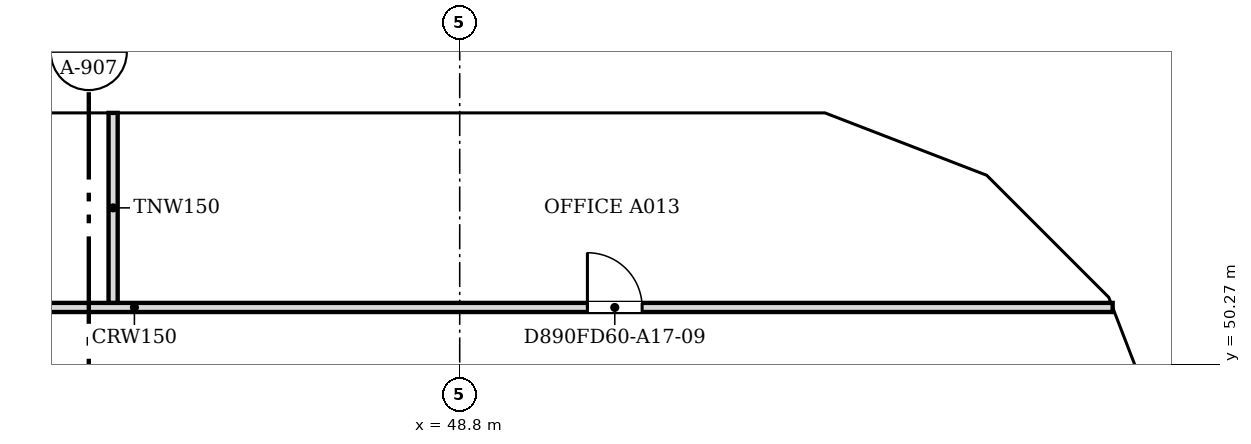
"""IFC4 building model, lengths in metres.
Left out: names, types, materials, properties, quantities, classifications, styles, units other than length and angle.
Written with IfcOpenShell. Run it as: python <this file> out.ifc"""

import sys

from ifc_helpers import new_model, si_unit, direction, frame, frame_2d, origin, place, context, subcontext, project, spatial, polyline, rectangle, outline, extrude, faceted_brep, source, transform, mapped, element, fill, save


model = new_model("IFC4")
c1 = context("Model", 3, precision=1e-05, world=origin(), true_north=direction((0.0, 1.0)))
c2 = subcontext(c1, "Body", "Model", "MODEL_VIEW")
j1 = project(units=[si_unit("LENGTHUNIT", "METRE"), si_unit("PLANEANGLEUNIT", "RADIAN")], contexts=[c1])
p1 = place(None, origin())
s1 = spatial("IfcSite", under=j1, at=p1, CompositionType="ELEMENT")
p2 = place(p1, origin())
s2 = spatial("IfcBuilding", under=s1, at=p2, CompositionType="ELEMENT")
p3 = place(p2, frame((0.0, 0.0, 185.8)))
s3 = spatial("IfcBuildingStorey", under=s2, at=p3, CompositionType="ELEMENT", Elevation=185.8)
m1 = source(origin(), c2, "Body", "Brep", [
    faceted_brep([(2.95, -0.25, 0.0), (3.003, -0.25, 0.068), (3.003, -0.25, 7.532), (2.95, -0.25, 7.6), (0.0, -0.25, 3.8), (0.047, 0.25, 3.86), (2.898, 0.25, 7.532), (2.898, 0.25, 0.068), (0.047, 0.25, 3.74), (2.95, 0.0, 0.0), (2.95, 0.0, 7.6), (0.0, 0.0, 3.8)], [[[0, 1, 2, 3, 4]], [[5, 6, 7, 8]], [[1, 0, 9]], [[10, 3, 2]], [[6, 5, 11, 4, 3, 10]], [[8, 7, 9, 0, 4, 11]], [[8, 11, 5]], [[1, 9, 7, 6, 10, 2]]]),
])
p4 = place(p3, frame((60.75, 48.753, -3.8), z_axis=(0.0, 0.0, 1.0), x_axis=(-0.35992665181, 0.932980602862, 0.0)))
e1 = element("IfcWall", 1, at=p4, inside=s3, PredefinedType="SOLIDWALL", context=c2, shape_type="MappedRepresentation", body=[
    mapped(m1, transform((0.0, 0.0, 0.0), scale=1.0)),
])
m2 = source(origin(), c2, "Body", "SweptSolid", [
    extrude(outline(polyline([(2.75, 6.935), (0.316, 3.8), (2.75, 0.665), (2.75, 6.935)])), frame((0.0, 0.26, 0.0), z_axis=(0.0, -1.0, 0.0), x_axis=(1.0, 0.0, 0.0)), (0.0, 0.0, 1.0), 0.52),
])
p5 = place(p4, origin())
e2 = element("IfcOpeningElement", 2, at=p5, cuts=e1, PredefinedType="OPENING", context=c2, shape_type="MappedRepresentation", body=[
    mapped(m2, transform((0.0, 0.0, 0.0), scale=1.0)),
])
m3 = source(origin(), c2, "Body", "Brep", [
    faceted_brep([(0.053, -0.25, 0.0), (2.997, -0.25, 3.8), (0.053, -0.25, 7.6), (0.0, -0.25, 7.532), (0.0, -0.25, 0.068), (0.106, 0.25, 7.532), (2.944, 0.25, 3.868), (2.944, 0.25, 3.732), (0.106, 0.25, 0.068), (2.997, 0.0, 3.8), (0.053, 0.0, 0.0), (0.053, 0.0, 7.6)], [[[0, 1, 2, 3, 4]], [[5, 6, 7, 8]], [[8, 7, 9, 1, 0, 10]], [[6, 5, 11, 2, 1, 9]], [[3, 2, 11]], [[10, 0, 4]], [[8, 10, 4, 3, 11, 5]], [[9, 7, 6]]]),
])
p6 = place(p3, frame((59.726, 51.469, -3.8), z_axis=(0.0, 0.0, 1.0), x_axis=(-0.707106781187, 0.707106781187, 0.0)))
e3 = element("IfcWall", 3, at=p6, inside=s3, PredefinedType="SOLIDWALL", context=c2, shape_type="MappedRepresentation", body=[
    mapped(m3, transform((0.0, 0.0, 0.0), scale=1.0)),
])
m4 = source(origin(), c2, "Body", "SweptSolid", [
    extrude(outline(polyline([(0.253, 0.666), (2.681, 3.8), (0.253, 6.934), (0.253, 0.666)])), frame((0.0, 0.26, 0.0), z_axis=(0.0, -1.0, 0.0), x_axis=(1.0, 0.0, 0.0)), (0.0, 0.0, 1.0), 0.52),
])
p7 = place(p6, origin())
e4 = element("IfcOpeningElement", 4, at=p7, cuts=e3, PredefinedType="OPENING", context=c2, shape_type="MappedRepresentation", body=[
    mapped(m4, transform((0.0, 0.0, 0.0), scale=1.0)),
])
m5 = source(origin(), c2, "Body", "Brep", [
    faceted_brep([(2.95, -0.25, 0.0), (2.997, -0.25, 0.059), (2.997, -0.25, 7.541), (2.95, -0.25, 7.6), (0.0, -0.25, 3.8), (0.053, 0.25, 3.868), (2.904, 0.25, 7.54), (2.904, 0.25, 0.06), (0.053, 0.25, 3.732), (2.95, 0.0, 0.0), (2.95, 0.0, 7.6), (0.0, 0.0, 3.8)], [[[0, 1, 2, 3, 4]], [[5, 6, 7, 8]], [[1, 0, 9]], [[10, 3, 2]], [[6, 5, 11, 4, 3, 10]], [[8, 7, 9, 0, 4, 11]], [[8, 11, 5]], [[1, 9, 7, 6, 10, 2]]]),
])
p8 = place(p3, frame((57.606, 53.588, -3.8), z_axis=(0.0, 0.0, 1.0), x_axis=(-0.932990326376, 0.359901446078, 0.0)))
e5 = element("IfcWall", 5, at=p8, inside=s3, PredefinedType="SOLIDWALL", context=c2, shape_type="MappedRepresentation", body=[
    mapped(m5, transform((0.0, 0.0, 0.0), scale=1.0)),
])
p9 = place(p8, origin())
e6 = element("IfcOpeningElement", 6, at=p9, cuts=e5, PredefinedType="OPENING", context=c2, shape_type="MappedRepresentation", body=[
    mapped(m2, transform((0.0, 0.0, 0.0), scale=1.0)),
])
m6 = source(origin(), c2, "Body", "Brep", [
    faceted_brep([(0.047, -0.25, 0.0), (3.05, -0.25, 3.8), (0.047, -0.25, 7.6), (0.0, -0.25, 7.54), (0.0, -0.25, 0.06), (0.093, 0.25, 7.541), (3.05, 0.25, 3.8), (0.093, 0.25, 0.059), (0.047, 0.0, 0.0), (0.047, 0.0, 7.6)], [[[0, 1, 2, 3, 4]], [[5, 6, 7]], [[7, 6, 1, 0, 8]], [[6, 5, 9, 2, 1]], [[3, 2, 9]], [[8, 0, 4]], [[7, 8, 4, 3, 9, 5]]]),
])
p10 = place(p3, frame((54.9, 54.65, -3.8), z_axis=(0.0, 0.0, 1.0), x_axis=(-1.0, 0.0, 0.0)))
e7 = element("IfcWall", 7, at=p10, inside=s3, PredefinedType="SOLIDWALL", context=c2, shape_type="MappedRepresentation", body=[
    mapped(m6, transform((0.0, 0.0, 0.0), scale=1.0)),
])
m7 = source(origin(), c2, "Body", "SweptSolid", [
    extrude(outline(polyline([(0.247, 0.656), (2.731, 3.8), (0.247, 6.944), (0.247, 0.656)])), frame((0.0, 0.26, 0.0), z_axis=(0.0, -1.0, 0.0), x_axis=(1.0, 0.0, 0.0)), (0.0, 0.0, 1.0), 0.52),
])
p11 = place(p10, origin())
e8 = element("IfcOpeningElement", 8, at=p11, cuts=e7, PredefinedType="OPENING", context=c2, shape_type="MappedRepresentation", body=[
    mapped(m7, transform((0.0, 0.0, 0.0), scale=1.0)),
])
m8 = source(origin(), c2, "Body", "SweptSolid", [
    extrude(outline(polyline([(3.05, 0.0), (6.1, 3.8), (3.05, 7.6), (0.0, 3.8), (3.05, 0.0)])), frame((0.0, 0.25, 0.0), z_axis=(0.0, -1.0, 0.0), x_axis=(1.0, 0.0, 0.0)), (0.0, 0.0, 1.0), 0.5),
])
p12 = place(p3, frame((51.85, 54.65, -3.8), z_axis=(0.0, 0.0, 1.0), x_axis=(-1.0, 0.0, 0.0)))
e9 = element("IfcWall", 9, at=p12, inside=s3, PredefinedType="SOLIDWALL", context=c2, shape_type="MappedRepresentation", body=[
    mapped(m8, transform((0.0, 0.0, 0.0), scale=1.0)),
])
m9 = source(origin(), c2, "Body", "SweptSolid", [
    extrude(outline(polyline([(3.05, 0.399), (5.78, 3.8), (3.05, 7.201), (0.321, 3.8), (3.05, 0.399)])), frame((0.0, 0.26, 0.0), z_axis=(0.0, -1.0, 0.0), x_axis=(1.0, 0.0, 0.0)), (0.0, 0.0, 1.0), 0.52),
])
p13 = place(p12, origin())
e10 = element("IfcOpeningElement", 10, at=p13, cuts=e9, PredefinedType="OPENING", context=c2, shape_type="MappedRepresentation", body=[
    mapped(m9, transform((0.0, 0.0, 0.0), scale=1.0)),
])
p14 = place(p3, frame((45.75, 54.65, -3.8), z_axis=(0.0, 0.0, 1.0), x_axis=(-1.0, 0.0, 0.0)))
e11 = element("IfcWall", 11, at=p14, inside=s3, PredefinedType="SOLIDWALL", context=c2, shape_type="MappedRepresentation", body=[
    mapped(m8, transform((0.0, 0.0, 0.0), scale=1.0)),
])
p15 = place(p14, origin())
e12 = element("IfcOpeningElement", 12, at=p15, cuts=e11, PredefinedType="OPENING", context=c2, shape_type="MappedRepresentation", body=[
    mapped(m9, transform((0.0, 0.0, 0.0), scale=1.0)),
])
p16 = place(p2, frame((0.0, 0.0, 189.6)))
s4 = spatial("IfcBuildingStorey", under=s2, at=p16, CompositionType="ELEMENT", Elevation=189.6)
m10 = source(origin(), c2, "Body", "Brep", [
    faceted_brep([(0.047, -0.25, 0.0), (2.997, -0.25, 3.8), (0.047, -0.25, 7.6), (0.0, -0.25, 7.541), (0.0, -0.25, 0.059), (0.093, 0.25, 7.54), (2.944, 0.25, 3.868), (2.944, 0.25, 3.732), (0.093, 0.25, 0.06), (2.997, 0.0, 3.8), (0.047, 0.0, 0.0), (0.047, 0.0, 7.6)], [[[0, 1, 2, 3, 4]], [[5, 6, 7, 8]], [[8, 7, 9, 1, 0, 10]], [[6, 5, 11, 2, 1, 9]], [[3, 2, 11]], [[10, 0, 4]], [[8, 10, 4, 3, 11, 5]], [[7, 6, 9]]]),
])
p17 = place(p16, frame((60.767, 48.71, -3.8), z_axis=(0.0, 0.0, 1.0), x_axis=(-0.359901446078, 0.932990326376, 0.0)))
e13 = element("IfcWall", 13, at=p17, inside=s4, PredefinedType="SOLIDWALL", context=c2, shape_type="MappedRepresentation", body=[
    mapped(m10, transform((0.0, 0.0, 0.0), scale=1.0)),
])
m11 = source(origin(), c2, "Body", "SweptSolid", [
    extrude(outline(polyline([(0.247, 0.665), (2.681, 3.8), (0.247, 6.935), (0.247, 0.665)])), frame((0.0, 0.26, 0.0), z_axis=(0.0, -1.0, 0.0), x_axis=(1.0, 0.0, 0.0)), (0.0, 0.0, 1.0), 0.52),
])
p18 = place(p17, origin())
e14 = element("IfcOpeningElement", 14, at=p18, cuts=e13, PredefinedType="OPENING", context=c2, shape_type="MappedRepresentation", body=[
    mapped(m11, transform((0.0, 0.0, 0.0), scale=1.0)),
])
m12 = source(origin(), c2, "Body", "Brep", [
    faceted_brep([(2.944, -0.25, 0.0), (2.997, -0.25, 0.068), (2.997, -0.25, 7.532), (2.944, -0.25, 7.6), (0.0, -0.25, 3.8), (0.053, 0.25, 3.868), (2.891, 0.25, 7.532), (2.891, 0.25, 0.068), (0.053, 0.25, 3.732), (2.944, 0.0, 0.0), (2.944, 0.0, 7.6), (0.0, 0.0, 3.8)], [[[0, 1, 2, 3, 4]], [[5, 6, 7, 8]], [[1, 0, 9]], [[10, 3, 2]], [[6, 5, 11, 4, 3, 10]], [[8, 7, 9, 0, 4, 11]], [[8, 11, 5]], [[1, 9, 7, 6, 10, 2]]]),
])
p19 = place(p16, frame((59.688, 51.506, -3.8), z_axis=(0.0, 0.0, 1.0), x_axis=(-0.707106781187, 0.707106781187, 0.0)))
e15 = element("IfcWall", 15, at=p19, inside=s4, PredefinedType="SOLIDWALL", context=c2, shape_type="MappedRepresentation", body=[
    mapped(m12, transform((0.0, 0.0, 0.0), scale=1.0)),
])
m13 = source(origin(), c2, "Body", "SweptSolid", [
    extrude(outline(polyline([(2.744, 6.934), (0.316, 3.8), (2.744, 0.666), (2.744, 6.934)])), frame((0.0, 0.26, 0.0), z_axis=(0.0, -1.0, 0.0), x_axis=(1.0, 0.0, 0.0)), (0.0, 0.0, 1.0), 0.52),
])
p20 = place(p19, origin())
e16 = element("IfcOpeningElement", 16, at=p20, cuts=e15, PredefinedType="OPENING", context=c2, shape_type="MappedRepresentation", body=[
    mapped(m13, transform((0.0, 0.0, 0.0), scale=1.0)),
])
m14 = source(origin(), c2, "Body", "Brep", [
    faceted_brep([(0.053, -0.25, 0.0), (3.003, -0.25, 3.8), (0.053, -0.25, 7.6), (0.0, -0.25, 7.531), (0.0, -0.25, 0.068), (0.106, 0.25, 7.532), (2.957, 0.25, 3.86), (2.957, 0.25, 3.74), (0.106, 0.25, 0.068), (3.003, 0.0, 3.8), (0.053, 0.0, 0.0), (0.053, 0.0, 7.6)], [[[0, 1, 2, 3, 4]], [[5, 6, 7, 8]], [[8, 7, 9, 1, 0, 10]], [[6, 5, 11, 2, 1, 9]], [[3, 2, 11]], [[10, 0, 4]], [[8, 10, 4, 3, 11, 5]], [[7, 6, 9]]]),
])
p21 = place(p16, frame((57.656, 53.569, -3.8), z_axis=(0.0, 0.0, 1.0), x_axis=(-0.933007896601, 0.359855894603, 0.0)))
e17 = element("IfcWall", 17, at=p21, inside=s4, PredefinedType="SOLIDWALL", context=c2, shape_type="MappedRepresentation", body=[
    mapped(m14, transform((0.0, 0.0, 0.0), scale=1.0)),
])
m15 = source(origin(), c2, "Body", "SweptSolid", [
    extrude(outline(polyline([(0.253, 0.665), (2.687, 3.8), (0.253, 6.935), (0.253, 0.665)])), frame((0.0, 0.26, 0.0), z_axis=(0.0, -1.0, 0.0), x_axis=(1.0, 0.0, 0.0)), (0.0, 0.0, 1.0), 0.52),
])
p22 = place(p21, origin())
e18 = element("IfcOpeningElement", 18, at=p22, cuts=e17, PredefinedType="OPENING", context=c2, shape_type="MappedRepresentation", body=[
    mapped(m15, transform((0.0, 0.0, 0.0), scale=1.0)),
])
m16 = source(origin(), c2, "Body", "Brep", [
    faceted_brep([(3.003, -0.25, 0.0), (6.053, -0.25, 3.8), (3.003, -0.25, 7.6), (0.0, -0.25, 3.8), (0.047, 0.25, 3.859), (3.003, 0.25, 7.6), (6.053, 0.25, 3.8), (3.003, 0.25, 0.0), (0.047, 0.25, 3.741), (0.0, 0.0, 3.8)], [[[0, 1, 2, 3]], [[4, 5, 6, 7, 8]], [[7, 6, 1, 0]], [[6, 5, 2, 1]], [[5, 4, 9, 3, 2]], [[8, 7, 0, 3, 9]], [[8, 9, 4]]]),
])
p23 = place(p16, frame((54.854, 54.65, -3.8), z_axis=(0.0, 0.0, 1.0), x_axis=(-1.0, 0.0, 0.0)))
e19 = element("IfcWall", 19, at=p23, inside=s4, PredefinedType="SOLIDWALL", context=c2, shape_type="MappedRepresentation", body=[
    mapped(m16, transform((0.0, 0.0, 0.0), scale=1.0)),
])
m17 = source(origin(), c2, "Body", "SweptSolid", [
    extrude(outline(polyline([(3.005, 0.401), (5.733, 3.8), (3.005, 7.199), (0.319, 3.8), (3.005, 0.401)])), frame((0.0, 0.26, 0.0), z_axis=(0.0, -1.0, 0.0), x_axis=(1.0, 0.0, 0.0)), (0.0, 0.0, 1.0), 0.52),
])
p24 = place(p23, origin())
e20 = element("IfcOpeningElement", 20, at=p24, cuts=e19, PredefinedType="OPENING", context=c2, shape_type="MappedRepresentation", body=[
    mapped(m17, transform((0.0, 0.0, 0.0), scale=1.0)),
])
m18 = source(origin(), c2, "Body", "SweptSolid", [
    extrude(outline(polyline([(3.05, 0.0), (6.1, 3.8), (3.05, 7.6), (0.0, 3.8), (3.05, 0.0)])), frame((0.0, 0.25, 0.0), z_axis=(0.0, -1.0, 0.0), x_axis=(1.0, 0.0, 0.0)), (0.0, 0.0, 1.0), 0.5),
])
p25 = place(p16, frame((48.8, 54.65, -3.8), z_axis=(0.0, 0.0, 1.0), x_axis=(-1.0, 0.0, 0.0)))
e21 = element("IfcWall", 21, at=p25, inside=s4, PredefinedType="SOLIDWALL", context=c2, shape_type="MappedRepresentation", body=[
    mapped(m18, transform((0.0, 0.0, 0.0), scale=1.0)),
])
m19 = source(origin(), c2, "Body", "SweptSolid", [
    extrude(outline(polyline([(3.05, 0.399), (5.78, 3.8), (3.05, 7.2), (0.321, 3.8), (3.05, 0.399)])), frame((0.0, 0.26, 0.0), z_axis=(0.0, -1.0, 0.0), x_axis=(1.0, 0.0, 0.0)), (0.0, 0.0, 1.0), 0.52),
])
p26 = place(p25, origin())
e22 = element("IfcOpeningElement", 22, at=p26, cuts=e21, PredefinedType="OPENING", context=c2, shape_type="MappedRepresentation", body=[
    mapped(m19, transform((0.0, 0.0, 0.0), scale=1.0)),
])
m20 = source(origin(), c2, "Body", "Brep", [
    faceted_brep([(3.05, -0.25, 0.0), (6.1, -0.25, 3.8), (6.1, -0.25, 3.8), (3.05, -0.25, 7.6), (0.0, -0.25, 3.8), (0.0, 0.25, 3.8), (3.05, 0.25, 7.6), (6.1, 0.25, 3.8), (6.1, 0.25, 3.8), (3.05, 0.25, 0.0)], [[[0, 1, 2, 3, 4]], [[5, 6, 7, 8, 9]], [[9, 8, 1, 0]], [[7, 6, 3, 2]], [[6, 5, 4, 3]], [[5, 9, 0, 4]], [[1, 8, 7, 2]]]),
])
p27 = place(p16, frame((42.7, 54.65, -3.8), z_axis=(0.0, 0.0, 1.0), x_axis=(-1.0, 0.0, 0.0)))
e23 = element("IfcWall", 23, at=p27, inside=s4, PredefinedType="SOLIDWALL", context=c2, shape_type="MappedRepresentation", body=[
    mapped(m20, transform((0.0, 0.0, 0.0), scale=1.0)),
])
p28 = place(p27, origin())
e24 = element("IfcOpeningElement", 24, at=p28, cuts=e23, PredefinedType="OPENING", context=c2, shape_type="MappedRepresentation", body=[
    mapped(m19, transform((0.0, 0.0, 0.0), scale=1.0)),
])
p29 = place(p3, frame((28.1, 51.2, 0.0), z_axis=(0.0, 0.0, 1.0), x_axis=(1.0, 0.0, 0.0)))
e25 = element("IfcWall", 25, at=p29, inside=s3, PredefinedType="PARTITIONING", context=c2, shape_type="SweptSolid", body=[
    extrude(rectangle(XDim=31.438, YDim=0.15, at=frame_2d((15.719, 0.0))), origin(), (0.0, 0.0, 1.0), 3.067),
])
m21 = source(origin(), c2, "Body", "SweptSolid", [
    extrude(rectangle(XDim=0.9, YDim=2.1, at=frame_2d((0.45, 1.05))), frame((0.0, 0.085, 0.0), z_axis=(0.0, -1.0, 0.0), x_axis=(1.0, 0.0, 0.0)), (0.0, 0.0, 1.0), 0.17),
])
p30 = place(p29, frame((7.0, 0.0, 0.0)))
e26 = element("IfcOpeningElement", 26, at=p30, cuts=e25, PredefinedType="OPENING", context=c2, shape_type="MappedRepresentation", body=[
    mapped(m21, transform((0.0, 0.0, 0.0), scale=1.0)),
])
p31 = place(p29, frame((22.8, 0.0, 0.0)))
e27 = element("IfcOpeningElement", 27, at=p31, cuts=e25, PredefinedType="OPENING", context=c2, shape_type="MappedRepresentation", body=[
    mapped(m21, transform((0.0, 0.0, 0.0), scale=1.0)),
])
p32 = place(p3, frame((43.1, 51.276, 0.0), z_axis=(0.0, 0.0, 1.0), x_axis=(0.0, 1.0, 0.0)))
e28 = element("IfcWall", 28, at=p32, inside=s3, PredefinedType="PARTITIONING", context=c2, shape_type="SweptSolid", body=[
    extrude(rectangle(XDim=3.124, YDim=0.15, at=frame_2d((1.562, 0.0))), origin(), (0.0, 0.0, 1.0), 3.067),
])
m22 = source(origin(), c2, "Body", "SweptSolid", [
    extrude(rectangle(XDim=0.9, YDim=2.1, at=frame_2d((0.45, 1.05))), frame((0.0, 0.025, 0.0), z_axis=(0.0, -1.0, 0.0), x_axis=(1.0, 0.0, 0.0)), (0.0, 0.0, 1.0), 0.05),
])
p33 = place(p31, origin())
e29 = element("IfcDoor", 29, at=p33, inside=s3, OperationType="SINGLE_SWING_LEFT", PredefinedType="DOOR", context=c2, shape_type="MappedRepresentation", body=[
    mapped(m22, transform((0.0, 0.0, 0.0), scale=1.0)),
])
fill(e27, e29)
save(model, sys.argv[1])
